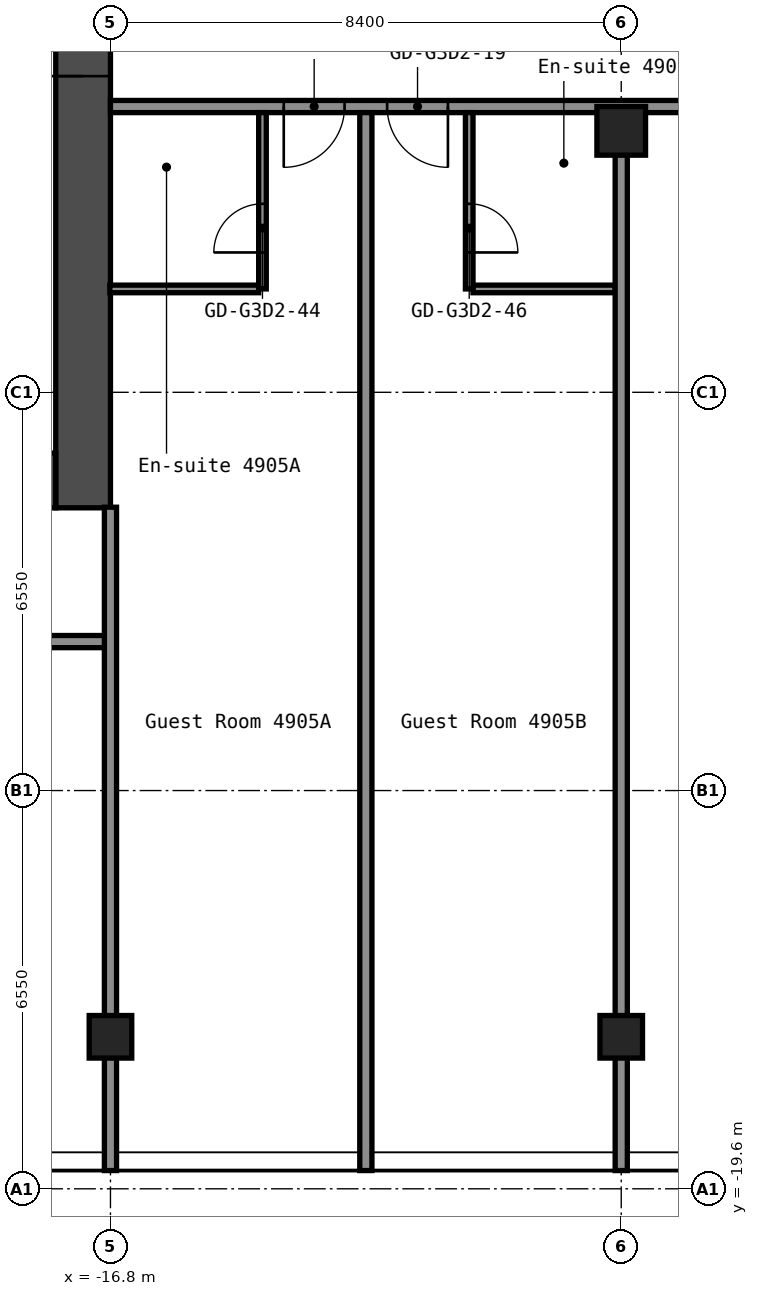
"""IFC4 building model, lengths in metres.
Left out: names, types, materials, properties, quantities, classifications, styles, units other than length and angle.
Written with IfcOpenShell. Run it as: python <this file> out.ifc"""

import sys

from ifc_helpers import new_model, si_unit, direction, frame, frame_2d, origin, origin_2d, place, context, subcontext, project, spatial, rectangle, hollow_rectangle, extrude, element, fill, save


model = new_model("IFC4")
c1 = context("Model", 3, precision=1e-05, world=origin(), true_north=direction((0.0, 1.0)))
c2 = subcontext(c1, "Body", "Model", "MODEL_VIEW")
j1 = project(units=[si_unit("LENGTHUNIT", "METRE"), si_unit("PLANEANGLEUNIT", "RADIAN")], contexts=[c1])
p1 = place(None, origin())
s1 = spatial("IfcSite", under=j1, at=p1, CompositionType="ELEMENT")
p2 = place(p1, origin())
s2 = spatial("IfcBuilding", under=s1, at=p2, CompositionType="ELEMENT")
p3 = place(p2, frame((0.0, 0.0, 172.6)))
s3 = spatial("IfcBuildingStorey", under=s2, at=p3, CompositionType="ELEMENT", Elevation=172.6)
for number, where, z_axis, x_axis in (
    (1, (-16.8, -17.1, 0.0), (0.0, 0.0, 1.0), (1.0, 0.0, 0.0)),
    (2, (-8.4, -17.1, 0.0), (0.0, 0.0, 1.0), (1.0, 0.0, 0.0)),
):
    element("IfcColumn", number, at=place(p3, frame(where, z_axis=z_axis, x_axis=x_axis)), inside=s3, PredefinedType="COLUMN", context=c2, shape_type="SweptSolid", body=[
        extrude(hollow_rectangle(XDim=0.7, YDim=0.7, WallThickness=0.028, at=origin_2d()), origin(), (0.0, 0.0, 1.0), 2.9),
    ])
p4 = place(p3, frame((-8.4, -2.2, 0.0), z_axis=(0.0, 0.0, 1.0), x_axis=(1.0, 0.0, 0.0)))
e3 = element("IfcColumn", 3, at=p4, inside=s3, PredefinedType="COLUMN", context=c2, shape_type="SweptSolid", body=[
    extrude(hollow_rectangle(XDim=0.8, YDim=0.8, WallThickness=0.032, at=origin_2d()), origin(), (0.0, 0.0, 1.0), 2.9),
])
p5 = place(p3, frame((-17.25, -8.4, 0.0), z_axis=(0.0, 0.0, 1.0), x_axis=(0.0, 1.0, 0.0)))
e4 = element("IfcWall", 4, at=p5, inside=s3, PredefinedType="SHEAR", context=c2, shape_type="SweptSolid", body=[
    extrude(rectangle(XDim=16.8, YDim=0.9, at=frame_2d((8.4, 0.0))), origin(), (0.0, 0.0, 1.0), 2.9),
])
p6 = place(p5, frame((7.1, 0.0, 0.0)))
e5 = element("IfcOpeningElement", 5, at=p6, cuts=e4, PredefinedType="OPENING", context=c2, shape_type="SweptSolid", body=[
    extrude(rectangle(XDim=1.6, YDim=2.1, at=frame_2d((0.8, 1.05))), frame((0.0, 0.46, 0.0), z_axis=(0.0, -1.0, 0.0), x_axis=(1.0, 0.0, 0.0)), (0.0, 0.0, 1.0), 0.92),
])
p7 = place(p3, frame((-32.7, -7.95, 0.0), z_axis=(0.0, 0.0, 1.0), x_axis=(1.0, 0.0, 0.0)))
e6 = element("IfcWall", 6, at=p7, inside=s3, PredefinedType="SHEAR", context=c2, shape_type="SweptSolid", body=[
    extrude(rectangle(XDim=15.0, YDim=0.9, at=frame_2d((7.5, 0.0))), origin(), (0.0, 0.0, 1.0), 2.9),
])
p8 = place(p7, frame((11.45, 0.0, 0.0)))
e7 = element("IfcOpeningElement", 7, at=p8, cuts=e6, PredefinedType="OPENING", context=c2, shape_type="SweptSolid", body=[
    extrude(rectangle(XDim=1.0, YDim=2.1, at=frame_2d((0.5, 1.05))), frame((0.0, 0.46, 0.0), z_axis=(0.0, -1.0, 0.0), x_axis=(1.0, 0.0, 0.0)), (0.0, 0.0, 1.0), 0.92),
])
p9 = place(p3, frame((-42.7, -10.6, 0.0), z_axis=(0.0, 0.0, 1.0), x_axis=(1.0, 0.0, 0.0)))
e8 = element("IfcWall", 8, at=p9, inside=s3, PredefinedType="PARTITIONING", context=c2, shape_type="SweptSolid", body=[
    extrude(rectangle(XDim=25.9, YDim=0.2, at=frame_2d((12.95, 0.0))), origin(), (0.0, 0.0, 1.0), 2.9),
])
p10 = place(p9, frame((2.5, 0.0, 0.0)))
e9 = element("IfcOpeningElement", 9, at=p10, cuts=e8, PredefinedType="OPENING", context=c2, shape_type="SweptSolid", body=[
    extrude(rectangle(XDim=1.0, YDim=2.1, at=frame_2d((0.5, 1.05))), frame((0.0, 0.11, 0.0), z_axis=(0.0, -1.0, 0.0), x_axis=(1.0, 0.0, 0.0)), (0.0, 0.0, 1.0), 0.22),
])
p11 = place(p9, frame((11.95, 0.0, 0.0)))
e10 = element("IfcOpeningElement", 10, at=p11, cuts=e8, PredefinedType="OPENING", context=c2, shape_type="SweptSolid", body=[
    extrude(rectangle(XDim=1.0, YDim=2.1, at=frame_2d((0.5, 1.05))), frame((0.0, 0.11, 0.0), z_axis=(0.0, -1.0, 0.0), x_axis=(1.0, 0.0, 0.0)), (0.0, 0.0, 1.0), 0.22),
])
p12 = place(p9, frame((13.65, 0.0, 0.0)))
e11 = element("IfcOpeningElement", 11, at=p12, cuts=e8, PredefinedType="OPENING", context=c2, shape_type="SweptSolid", body=[
    extrude(rectangle(XDim=1.0, YDim=2.1, at=frame_2d((0.5, 1.05))), frame((0.0, 0.11, 0.0), z_axis=(0.0, -1.0, 0.0), x_axis=(1.0, 0.0, 0.0)), (0.0, 0.0, 1.0), 0.22),
])
p13 = place(p9, frame((22.9, 0.0, 0.0)))
e12 = element("IfcOpeningElement", 12, at=p13, cuts=e8, PredefinedType="OPENING", context=c2, shape_type="SweptSolid", body=[
    extrude(rectangle(XDim=1.0, YDim=2.1, at=frame_2d((0.5, 1.05))), frame((0.0, 0.11, 0.0), z_axis=(0.0, -1.0, 0.0), x_axis=(1.0, 0.0, 0.0)), (0.0, 0.0, 1.0), 0.22),
])
p14 = place(p3, frame((-16.81, -4.8, 0.0), z_axis=(0.0, 0.0, 1.0), x_axis=(1.0, 0.0, 0.0)))
e13 = element("IfcWall", 13, at=p14, inside=s3, PredefinedType="PARTITIONING", context=c2, shape_type="SweptSolid", body=[
    extrude(rectangle(XDim=2.448, YDim=0.125, at=frame_2d((1.224, 0.0))), origin(), (0.0, 0.0, 1.0), 2.9),
])
p15 = place(p3, frame((-10.837, -4.8, 0.0), z_axis=(0.0, 0.0, 1.0), x_axis=(1.0, 0.0, 0.0)))
e14 = element("IfcWall", 14, at=p15, inside=s3, PredefinedType="PARTITIONING", context=c2, shape_type="SweptSolid", body=[
    extrude(rectangle(XDim=2.337, YDim=0.125, at=frame_2d((1.169, 0.0))), origin(), (0.0, 0.0, 1.0), 2.9),
])
p16 = place(p3, frame((-16.8, -1.8, 0.0), z_axis=(0.0, 0.0, 1.0), x_axis=(1.0, 0.0, 0.0)))
e15 = element("IfcWall", 15, at=p16, inside=s3, PredefinedType="PARTITIONING", context=c2, shape_type="SweptSolid", body=[
    extrude(rectangle(XDim=33.6, YDim=0.2, at=frame_2d((16.8, 0.0))), origin(), (0.0, 0.0, 1.0), 2.9),
])
p17 = place(p16, frame((2.85, 0.0, 0.0)))
e16 = element("IfcOpeningElement", 16, at=p17, cuts=e15, PredefinedType="OPENING", context=c2, shape_type="SweptSolid", body=[
    extrude(rectangle(XDim=1.0, YDim=2.1, at=frame_2d((0.5, 1.05))), frame((0.0, 0.11, 0.0), z_axis=(0.0, -1.0, 0.0), x_axis=(1.0, 0.0, 0.0)), (0.0, 0.0, 1.0), 0.22),
])
p18 = place(p16, frame((4.55, 0.0, 0.0)))
e17 = element("IfcOpeningElement", 17, at=p18, cuts=e15, PredefinedType="OPENING", context=c2, shape_type="SweptSolid", body=[
    extrude(rectangle(XDim=1.0, YDim=2.1, at=frame_2d((0.5, 1.05))), frame((0.0, 0.11, 0.0), z_axis=(0.0, -1.0, 0.0), x_axis=(1.0, 0.0, 0.0)), (0.0, 0.0, 1.0), 0.22),
])
p19 = place(p16, frame((12.1, 0.0, 0.0)))
e18 = element("IfcOpeningElement", 18, at=p19, cuts=e15, PredefinedType="OPENING", context=c2, shape_type="SweptSolid", body=[
    extrude(rectangle(XDim=1.0, YDim=2.1, at=frame_2d((0.5, 1.05))), frame((0.0, 0.11, 0.0), z_axis=(0.0, -1.0, 0.0), x_axis=(1.0, 0.0, 0.0)), (0.0, 0.0, 1.0), 0.22),
])
p20 = place(p16, frame((19.65, 0.0, 0.0)))
e19 = element("IfcOpeningElement", 19, at=p20, cuts=e15, PredefinedType="OPENING", context=c2, shape_type="SweptSolid", body=[
    extrude(rectangle(XDim=1.0, YDim=2.1, at=frame_2d((0.5, 1.05))), frame((0.0, 0.11, 0.0), z_axis=(0.0, -1.0, 0.0), x_axis=(1.0, 0.0, 0.0)), (0.0, 0.0, 1.0), 0.22),
])
p21 = place(p16, frame((21.35, 0.0, 0.0)))
e20 = element("IfcOpeningElement", 20, at=p21, cuts=e15, PredefinedType="OPENING", context=c2, shape_type="SweptSolid", body=[
    extrude(rectangle(XDim=1.0, YDim=2.1, at=frame_2d((0.5, 1.05))), frame((0.0, 0.11, 0.0), z_axis=(0.0, -1.0, 0.0), x_axis=(1.0, 0.0, 0.0)), (0.0, 0.0, 1.0), 0.22),
])
p22 = place(p16, frame((27.2, 0.0, 0.0)))
e21 = element("IfcOpeningElement", 21, at=p22, cuts=e15, PredefinedType="OPENING", context=c2, shape_type="SweptSolid", body=[
    extrude(rectangle(XDim=1.0, YDim=2.1, at=frame_2d((0.5, 1.05))), frame((0.0, 0.11, 0.0), z_axis=(0.0, -1.0, 0.0), x_axis=(1.0, 0.0, 0.0)), (0.0, 0.0, 1.0), 0.22),
])
p23 = place(p3, frame((-16.8, -19.3, 0.0), z_axis=(0.0, 0.0, 1.0), x_axis=(0.0, 1.0, 0.0)))
e22 = element("IfcWall", 22, at=p23, inside=s3, PredefinedType="PARTITIONING", context=c2, shape_type="SweptSolid", body=[
    extrude(rectangle(XDim=10.91, YDim=0.2, at=frame_2d((5.455, 0.0))), origin(), (0.0, 0.0, 1.0), 2.9),
])
p24 = place(p3, frame((-14.3, -4.8, 0.0), z_axis=(0.0, 0.0, 1.0), x_axis=(0.0, 1.0, 0.0)))
e23 = element("IfcWall", 23, at=p24, inside=s3, PredefinedType="PARTITIONING", context=c2, shape_type="SweptSolid", body=[
    extrude(rectangle(XDim=2.9, YDim=0.125, at=frame_2d((1.45, 0.0))), origin(), (0.0, 0.0, 1.0), 2.9),
])
p25 = place(p24, frame((0.6, 0.0, 0.0)))
e24 = element("IfcOpeningElement", 24, at=p25, cuts=e23, PredefinedType="OPENING", context=c2, shape_type="SweptSolid", body=[
    extrude(rectangle(XDim=0.8, YDim=2.1, at=frame_2d((0.4, 1.05))), frame((0.0, 0.073, 0.0), z_axis=(0.0, -1.0, 0.0), x_axis=(1.0, 0.0, 0.0)), (0.0, 0.0, 1.0), 0.145),
])
p26 = place(p3, frame((-12.6, -19.3, 0.0), z_axis=(0.0, 0.0, 1.0), x_axis=(0.0, 1.0, 0.0)))
e25 = element("IfcWall", 25, at=p26, inside=s3, PredefinedType="PARTITIONING", context=c2, shape_type="SweptSolid", body=[
    extrude(rectangle(XDim=17.4, YDim=0.2, at=frame_2d((8.7, 0.0))), origin(), (0.0, 0.0, 1.0), 2.9),
])
p27 = place(p3, frame((-10.9, -4.8, 0.0), z_axis=(0.0, 0.0, 1.0), x_axis=(0.0, 1.0, 0.0)))
e26 = element("IfcWall", 26, at=p27, inside=s3, PredefinedType="PARTITIONING", context=c2, shape_type="SweptSolid", body=[
    extrude(rectangle(XDim=2.9, YDim=0.125, at=frame_2d((1.45, 0.0))), origin(), (0.0, 0.0, 1.0), 2.9),
])
p28 = place(p27, frame((0.6, 0.0, 0.0)))
e27 = element("IfcOpeningElement", 27, at=p28, cuts=e26, PredefinedType="OPENING", context=c2, shape_type="SweptSolid", body=[
    extrude(rectangle(XDim=0.8, YDim=2.1, at=frame_2d((0.4, 1.05))), frame((0.0, 0.073, 0.0), z_axis=(0.0, -1.0, 0.0), x_axis=(1.0, 0.0, 0.0)), (0.0, 0.0, 1.0), 0.145),
])
p29 = place(p3, frame((-8.4, -19.3, 0.0), z_axis=(0.0, 0.0, 1.0), x_axis=(0.0, 1.0, 0.0)))
e28 = element("IfcWall", 28, at=p29, inside=s3, PredefinedType="PARTITIONING", context=c2, shape_type="SweptSolid", body=[
    extrude(rectangle(XDim=16.71, YDim=0.2, at=frame_2d((8.355, 0.0))), origin(), (0.0, 0.0, 1.0), 2.9),
])
p30 = place(p6, origin())
e29 = element("IfcDoor", 29, at=p30, inside=s3, OperationType="DOUBLE_DOOR_SINGLE_SWING", PredefinedType="DOOR", context=c2, shape_type="SweptSolid", body=[
    extrude(rectangle(XDim=1.6, YDim=2.1, at=frame_2d((0.8, 1.05))), frame((0.0, 0.025, 0.0), z_axis=(0.0, -1.0, 0.0), x_axis=(1.0, 0.0, 0.0)), (0.0, 0.0, 1.0), 0.05),
])
fill(e5, e29)
p31 = place(p17, origin())
e30 = element("IfcDoor", 30, at=p31, inside=s3, OperationType="SINGLE_SWING_LEFT", PredefinedType="DOOR", context=c2, shape_type="SweptSolid", body=[
    extrude(rectangle(XDim=1.0, YDim=2.1, at=frame_2d((0.5, 1.05))), frame((0.0, 0.025, 0.0), z_axis=(0.0, -1.0, 0.0), x_axis=(1.0, 0.0, 0.0)), (0.0, 0.0, 1.0), 0.05),
])
fill(e16, e30)
p32 = place(p18, origin())
e31 = element("IfcDoor", 31, at=p32, inside=s3, OperationType="SINGLE_SWING_RIGHT", PredefinedType="DOOR", context=c2, shape_type="SweptSolid", body=[
    extrude(rectangle(XDim=1.0, YDim=2.1, at=frame_2d((0.5, 1.05))), frame((0.0, 0.025, 0.0), z_axis=(0.0, -1.0, 0.0), x_axis=(1.0, 0.0, 0.0)), (0.0, 0.0, 1.0), 0.05),
])
fill(e17, e31)
p33 = place(p25, origin())
e32 = element("IfcDoor", 32, at=p33, inside=s3, OperationType="SINGLE_SWING_RIGHT", PredefinedType="DOOR", context=c2, shape_type="SweptSolid", body=[
    extrude(rectangle(XDim=0.8, YDim=2.1, at=frame_2d((0.4, 1.05))), frame((0.0, 0.025, 0.0), z_axis=(0.0, -1.0, 0.0), x_axis=(1.0, 0.0, 0.0)), (0.0, 0.0, 1.0), 0.05),
])
fill(e24, e32)
p34 = place(p28, origin())
e33 = element("IfcDoor", 33, at=p34, inside=s3, OperationType="SINGLE_SWING_LEFT", PredefinedType="DOOR", context=c2, shape_type="SweptSolid", body=[
    extrude(rectangle(XDim=0.8, YDim=2.1, at=frame_2d((0.4, 1.05))), frame((0.0, 0.025, 0.0), z_axis=(0.0, -1.0, 0.0), x_axis=(1.0, 0.0, 0.0)), (0.0, 0.0, 1.0), 0.05),
])
fill(e27, e33)
save(model, sys.argv[1])
